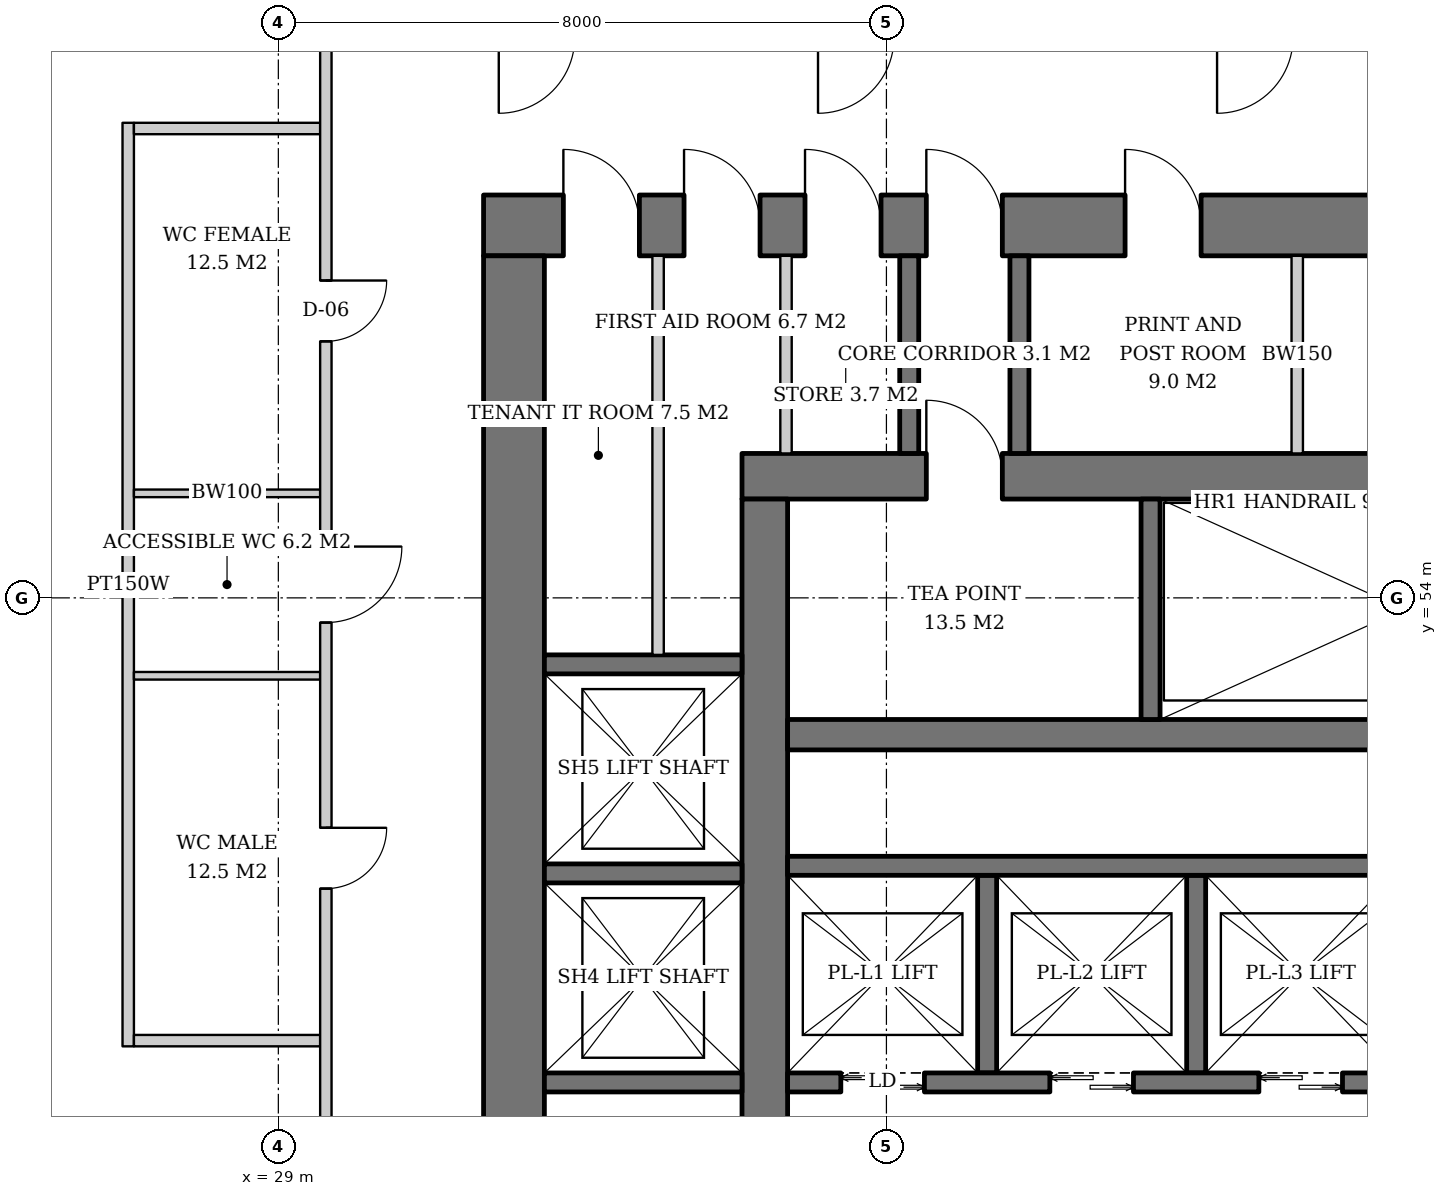
"""IFC4 building model, lengths in metres.
Left out: names, types, materials, properties, quantities, classifications, styles, units other than length and angle.
Written with IfcOpenShell. Run it as: python <this file> out.ifc"""

import sys

from ifc_helpers import new_model, si_unit, direction, frame, frame_2d, origin, place, context, subcontext, project, spatial, rectangle, extrude, element, fill, save


model = new_model("IFC4")
c1 = context("Model", 3, precision=1e-05, world=origin(), true_north=direction((0.0, 1.0)))
c2 = subcontext(c1, "Body", "Model", "MODEL_VIEW")
j1 = project(units=[si_unit("LENGTHUNIT", "METRE"), si_unit("PLANEANGLEUNIT", "RADIAN")], contexts=[c1])
p1 = place(None, origin())
s1 = spatial("IfcSite", under=j1, at=p1, CompositionType="ELEMENT")
p2 = place(p1, origin())
s2 = spatial("IfcBuilding", under=s1, at=p2, CompositionType="ELEMENT")
p3 = place(p2, frame((0.0, 0.0, 78.0)))
s3 = spatial("IfcBuildingStorey", under=s2, at=p3, CompositionType="ELEMENT", Elevation=78.0)
p4 = place(p3, frame((35.1, 55.6, 0.0), z_axis=(0.0, 0.0, 1.0), x_axis=(1.0, 0.0, 0.0)))
e1 = element("IfcWall", 1, at=p4, inside=s3, PredefinedType="SHEAR", context=c2, shape_type="SweptSolid", body=[
    extrude(rectangle(XDim=19.8, YDim=0.6, at=frame_2d((9.9, 0.0))), origin(), (0.0, 0.0, 1.0), 3.8),
])
p5 = place(p4, frame((14.54, 0.0, 0.0)))
e2 = element("IfcOpeningElement", 2, at=p5, cuts=e1, PredefinedType="OPENING", context=c2, shape_type="SweptSolid", body=[
    extrude(rectangle(XDim=1.0, YDim=2.1, at=frame_2d((0.5, 1.05))), frame((0.0, 0.31, 0.0), z_axis=(0.0, -1.0, 0.0), x_axis=(1.0, 0.0, 0.0)), (0.0, 0.0, 1.0), 0.62),
])
p6 = place(p4, frame((2.425, 0.0, 0.0)))
e3 = element("IfcOpeningElement", 3, at=p6, cuts=e1, PredefinedType="OPENING", context=c2, shape_type="SweptSolid", body=[
    extrude(rectangle(XDim=1.0, YDim=2.1, at=frame_2d((0.5, 1.05))), frame((0.0, 0.31, 0.0), z_axis=(0.0, -1.0, 0.0), x_axis=(1.0, 0.0, 0.0)), (0.0, 0.0, 1.0), 0.62),
])
p7 = place(p3, frame((35.4, 36.7, 0.0), z_axis=(0.0, 0.0, 1.0), x_axis=(0.0, 1.0, 0.0)))
e4 = element("IfcWall", 4, at=p7, inside=s3, PredefinedType="SHEAR", context=c2, shape_type="SweptSolid", body=[
    extrude(rectangle(XDim=18.6, YDim=0.6, at=frame_2d((9.3, 0.0))), origin(), (0.0, 0.0, 1.0), 3.8),
])
p8 = place(p7, frame((8.4, 0.0, 0.0)))
e5 = element("IfcOpeningElement", 5, at=p8, cuts=e4, PredefinedType="OPENING", context=c2, shape_type="SweptSolid", body=[
    extrude(rectangle(XDim=1.8, YDim=2.4, at=frame_2d((0.9, 1.2))), frame((0.0, 0.31, 0.0), z_axis=(0.0, -1.0, 0.0), x_axis=(1.0, 0.0, 0.0)), (0.0, 0.0, 1.0), 0.62),
])
p9 = place(p3, frame((31.7, 58.9, 0.0), z_axis=(0.0, 0.0, 1.0), x_axis=(1.0, 0.0, 0.0)))
e6 = element("IfcWall", 6, at=p9, inside=s3, PredefinedType="SHEAR", context=c2, shape_type="SweptSolid", body=[
    extrude(rectangle(XDim=26.6, YDim=0.8, at=frame_2d((13.3, 0.0))), origin(), (0.0, 0.0, 1.0), 3.8),
])
p10 = place(p9, frame((17.94, 0.0, 0.0)))
e7 = element("IfcOpeningElement", 7, at=p10, cuts=e6, PredefinedType="OPENING", context=c2, shape_type="SweptSolid", body=[
    extrude(rectangle(XDim=1.0, YDim=2.1, at=frame_2d((0.5, 1.05))), frame((0.0, 0.41, 0.0), z_axis=(0.0, -1.0, 0.0), x_axis=(1.0, 0.0, 0.0)), (0.0, 0.0, 1.0), 0.82),
])
p11 = place(p9, frame((5.825, 0.0, 0.0)))
e8 = element("IfcOpeningElement", 8, at=p11, cuts=e6, PredefinedType="OPENING", context=c2, shape_type="SweptSolid", body=[
    extrude(rectangle(XDim=1.0, YDim=2.1, at=frame_2d((0.5, 1.05))), frame((0.0, 0.41, 0.0), z_axis=(0.0, -1.0, 0.0), x_axis=(1.0, 0.0, 0.0)), (0.0, 0.0, 1.0), 0.82),
])
p12 = place(p9, frame((1.05, 0.0, 0.0)))
e9 = element("IfcOpeningElement", 9, at=p12, cuts=e6, PredefinedType="OPENING", context=c2, shape_type="SweptSolid", body=[
    extrude(rectangle(XDim=1.0, YDim=2.1, at=frame_2d((0.5, 1.05))), frame((0.0, 0.41, 0.0), z_axis=(0.0, -1.0, 0.0), x_axis=(1.0, 0.0, 0.0)), (0.0, 0.0, 1.0), 0.82),
])
p13 = place(p9, frame((2.637, 0.0, 0.0)))
e10 = element("IfcOpeningElement", 10, at=p13, cuts=e6, PredefinedType="OPENING", context=c2, shape_type="SweptSolid", body=[
    extrude(rectangle(XDim=1.0, YDim=2.1, at=frame_2d((0.5, 1.05))), frame((0.0, 0.41, 0.0), z_axis=(0.0, -1.0, 0.0), x_axis=(1.0, 0.0, 0.0)), (0.0, 0.0, 1.0), 0.82),
])
p14 = place(p9, frame((4.229, 0.0, 0.0)))
e11 = element("IfcOpeningElement", 11, at=p14, cuts=e6, PredefinedType="OPENING", context=c2, shape_type="SweptSolid", body=[
    extrude(rectangle(XDim=1.0, YDim=2.1, at=frame_2d((0.5, 1.05))), frame((0.0, 0.41, 0.0), z_axis=(0.0, -1.0, 0.0), x_axis=(1.0, 0.0, 0.0)), (0.0, 0.0, 1.0), 0.82),
])
p15 = place(p9, frame((8.44, 0.0, 0.0)))
e12 = element("IfcOpeningElement", 12, at=p15, cuts=e6, PredefinedType="OPENING", context=c2, shape_type="SweptSolid", body=[
    extrude(rectangle(XDim=1.0, YDim=2.1, at=frame_2d((0.5, 1.05))), frame((0.0, 0.41, 0.0), z_axis=(0.0, -1.0, 0.0), x_axis=(1.0, 0.0, 0.0)), (0.0, 0.0, 1.0), 0.82),
])
p16 = place(p9, frame((13.342, 0.0, 0.0)))
e13 = element("IfcOpeningElement", 13, at=p16, cuts=e6, PredefinedType="OPENING", context=c2, shape_type="SweptSolid", body=[
    extrude(rectangle(XDim=1.0, YDim=2.1, at=frame_2d((0.5, 1.05))), frame((0.0, 0.41, 0.0), z_axis=(0.0, -1.0, 0.0), x_axis=(1.0, 0.0, 0.0)), (0.0, 0.0, 1.0), 0.82),
])
p17 = place(p9, frame((22.35, 0.0, 0.0)))
e14 = element("IfcOpeningElement", 14, at=p17, cuts=e6, PredefinedType="OPENING", context=c2, shape_type="SweptSolid", body=[
    extrude(rectangle(XDim=1.0, YDim=2.1, at=frame_2d((0.5, 1.05))), frame((0.0, 0.41, 0.0), z_axis=(0.0, -1.0, 0.0), x_axis=(1.0, 0.0, 0.0)), (0.0, 0.0, 1.0), 0.82),
])
p18 = place(p3, frame((32.1, 33.5, 0.0), z_axis=(0.0, 0.0, 1.0), x_axis=(0.0, 1.0, 0.0)))
e15 = element("IfcWall", 15, at=p18, inside=s3, PredefinedType="SHEAR", context=c2, shape_type="SweptSolid", body=[
    extrude(rectangle(XDim=25.0, YDim=0.8, at=frame_2d((12.5, 0.0))), origin(), (0.0, 0.0, 1.0), 3.8),
])
p19 = place(p18, frame((11.6, 0.0, 0.0)))
e16 = element("IfcOpeningElement", 16, at=p19, cuts=e15, PredefinedType="OPENING", context=c2, shape_type="SweptSolid", body=[
    extrude(rectangle(XDim=1.8, YDim=2.4, at=frame_2d((0.9, 1.2))), frame((0.0, 0.41, 0.0), z_axis=(0.0, -1.0, 0.0), x_axis=(1.0, 0.0, 0.0)), (0.0, 0.0, 1.0), 0.82),
])
p20 = place(p3, frame((35.7, 52.2, 0.0), z_axis=(0.0, 0.0, 1.0), x_axis=(1.0, 0.0, 0.0)))
e17 = element("IfcWall", 17, at=p20, inside=s3, PredefinedType="SHEAR", context=c2, shape_type="SweptSolid", body=[
    extrude(rectangle(XDim=18.6, YDim=0.4, at=frame_2d((9.3, 0.0))), origin(), (0.0, 0.0, 1.0), 3.8),
])
p21 = place(p3, frame((40.475, 52.4, 0.0), z_axis=(0.0, 0.0, 1.0), x_axis=(0.0, 1.0, 0.0)))
e18 = element("IfcWall", 18, at=p21, inside=s3, PredefinedType="SHEAR", context=c2, shape_type="SweptSolid", body=[
    extrude(rectangle(XDim=2.9, YDim=0.25, at=frame_2d((1.45, 0.0))), origin(), (0.0, 0.0, 1.0), 3.8),
])
for number, where, z_axis, x_axis in (
    (19, (38.325, 47.75, 0.0), (0.0, 0.0, 1.0), (0.0, 1.0, 0.0)),
    (20, (41.075, 47.75, 0.0), (0.0, 0.0, 1.0), (0.0, 1.0, 0.0)),
):
    element("IfcWall", number, at=place(p3, frame(where, z_axis=z_axis, x_axis=x_axis)), inside=s3, PredefinedType="SHEAR", context=c2, shape_type="SweptSolid", body=[
        extrude(rectangle(XDim=2.6, YDim=0.25, at=frame_2d((1.3, 0.0))), origin(), (0.0, 0.0, 1.0), 3.8),
    ])
p22 = place(p3, frame((35.7, 50.475, 0.0), z_axis=(0.0, 0.0, 1.0), x_axis=(1.0, 0.0, 0.0)))
e21 = element("IfcWall", 21, at=p22, inside=s3, PredefinedType="SHEAR", context=c2, shape_type="SweptSolid", body=[
    extrude(rectangle(XDim=11.0, YDim=0.25, at=frame_2d((5.5, 0.0))), origin(), (0.0, 0.0, 1.0), 3.8),
])
p23 = place(p3, frame((35.7, 47.625, 0.0), z_axis=(0.0, 0.0, 1.0), x_axis=(1.0, 0.0, 0.0)))
e22 = element("IfcWall", 22, at=p23, inside=s3, PredefinedType="SHEAR", context=c2, shape_type="SweptSolid", body=[
    extrude(rectangle(XDim=12.83, YDim=0.25, at=frame_2d((6.415, 0.0))), origin(), (0.0, 0.0, 1.0), 3.8),
])
p24 = place(p23, frame((0.7, 0.0, 0.0)))
e23 = element("IfcOpeningElement", 23, at=p24, cuts=e22, PredefinedType="OPENING", context=c2, shape_type="SweptSolid", body=[
    extrude(rectangle(XDim=1.1, YDim=2.2, at=frame_2d((0.55, 1.1))), frame((0.0, 0.135, 0.0), z_axis=(0.0, -1.0, 0.0), x_axis=(1.0, 0.0, 0.0)), (0.0, 0.0, 1.0), 0.27),
])
p25 = place(p23, frame((3.45, 0.0, 0.0)))
e24 = element("IfcOpeningElement", 24, at=p25, cuts=e22, PredefinedType="OPENING", context=c2, shape_type="SweptSolid", body=[
    extrude(rectangle(XDim=1.1, YDim=2.2, at=frame_2d((0.55, 1.1))), frame((0.0, 0.135, 0.0), z_axis=(0.0, -1.0, 0.0), x_axis=(1.0, 0.0, 0.0)), (0.0, 0.0, 1.0), 0.27),
])
p26 = place(p23, frame((6.2, 0.0, 0.0)))
e25 = element("IfcOpeningElement", 25, at=p26, cuts=e22, PredefinedType="OPENING", context=c2, shape_type="SweptSolid", body=[
    extrude(rectangle(XDim=1.1, YDim=2.2, at=frame_2d((0.55, 1.1))), frame((0.0, 0.135, 0.0), z_axis=(0.0, -1.0, 0.0), x_axis=(1.0, 0.0, 0.0)), (0.0, 0.0, 1.0), 0.27),
])
p27 = place(p23, frame((8.95, 0.0, 0.0)))
e26 = element("IfcOpeningElement", 26, at=p27, cuts=e22, PredefinedType="OPENING", context=c2, shape_type="SweptSolid", body=[
    extrude(rectangle(XDim=1.1, YDim=2.2, at=frame_2d((0.55, 1.1))), frame((0.0, 0.135, 0.0), z_axis=(0.0, -1.0, 0.0), x_axis=(1.0, 0.0, 0.0)), (0.0, 0.0, 1.0), 0.27),
])
p28 = place(p23, frame((11.515, 0.0, 0.0)))
e27 = element("IfcOpeningElement", 27, at=p28, cuts=e22, PredefinedType="OPENING", context=c2, shape_type="SweptSolid", body=[
    extrude(rectangle(XDim=0.8, YDim=2.0, at=frame_2d((0.4, 1.0))), frame((0.0, 0.135, 0.0), z_axis=(0.0, -1.0, 0.0), x_axis=(1.0, 0.0, 0.0)), (0.0, 0.0, 1.0), 0.27),
])
for number, where, z_axis, x_axis in (
    (28, (32.5, 47.625, 0.0), (0.0, 0.0, 1.0), (1.0, 0.0, 0.0)),
    (29, (32.5, 50.375, 0.0), (0.0, 0.0, 1.0), (1.0, 0.0, 0.0)),
    (30, (32.5, 53.125, 0.0), (0.0, 0.0, 1.0), (1.0, 0.0, 0.0)),
):
    element("IfcWall", number, at=place(p3, frame(where, z_axis=z_axis, x_axis=x_axis)), inside=s3, PredefinedType="SHEAR", context=c2, shape_type="SweptSolid", body=[
        extrude(rectangle(XDim=2.6, YDim=0.25, at=frame_2d((1.3, 0.0))), origin(), (0.0, 0.0, 1.0), 3.8),
    ])
for number, where, z_axis, x_axis in (
    (31, (37.3, 55.9, 0.0), (0.0, 0.0, 1.0), (0.0, 1.0, 0.0)),
    (32, (38.75, 55.9, 0.0), (0.0, 0.0, 1.0), (0.0, 1.0, 0.0)),
):
    element("IfcWall", number, at=place(p3, frame(where, z_axis=z_axis, x_axis=x_axis)), inside=s3, PredefinedType="SOLIDWALL", context=c2, shape_type="SweptSolid", body=[
        extrude(rectangle(XDim=2.6, YDim=0.25, at=frame_2d((1.3, 0.0))), origin(), (0.0, 0.0, 1.0), 3.52),
    ])
p29 = place(p3, frame((33.996, 53.25, 0.0), z_axis=(0.0, 0.0, 1.0), x_axis=(0.0, 1.0, 0.0)))
e33 = element("IfcWall", 33, at=p29, inside=s3, PredefinedType="SOLIDWALL", context=c2, shape_type="SweptSolid", body=[
    extrude(rectangle(XDim=5.25, YDim=0.15, at=frame_2d((2.625, 0.0))), origin(), (0.0, 0.0, 1.0), 3.52),
])
for number, where, z_axis, x_axis in (
    (34, (35.679, 55.9, 0.0), (0.0, 0.0, 1.0), (0.0, 1.0, 0.0)),
    (35, (42.405, 55.9, 0.0), (0.0, 0.0, 1.0), (0.0, 1.0, 0.0)),
):
    element("IfcWall", number, at=place(p3, frame(where, z_axis=z_axis, x_axis=x_axis)), inside=s3, PredefinedType="SOLIDWALL", context=c2, shape_type="SweptSolid", body=[
        extrude(rectangle(XDim=2.6, YDim=0.15, at=frame_2d((1.3, 0.0))), origin(), (0.0, 0.0, 1.0), 3.52),
    ])
p30 = place(p3, frame((27.025, 60.25, 0.0), z_axis=(0.0, 0.0, 1.0), x_axis=(0.0, -1.0, 0.0)))
e36 = element("IfcWall", 36, at=p30, inside=s3, PredefinedType="PARTITIONING", context=c2, shape_type="SweptSolid", body=[
    extrude(rectangle(XDim=12.15, YDim=0.15, at=frame_2d((6.075, 0.0))), origin(), (0.0, 0.0, 1.0), 2.62),
])
p31 = place(p3, frame((29.55, 60.175, 0.0), z_axis=(0.0, 0.0, 1.0), x_axis=(-1.0, 0.0, 0.0)))
e37 = element("IfcWall", 37, at=p31, inside=s3, PredefinedType="PARTITIONING", context=c2, shape_type="SweptSolid", body=[
    extrude(rectangle(XDim=2.45, YDim=0.15, at=frame_2d((1.225, 0.0))), origin(), (0.0, 0.0, 1.0), 3.52),
])
for number, where, z_axis, x_axis in (
    (38, (29.55, 55.375, 0.0), (0.0, 0.0, 1.0), (-1.0, 0.0, 0.0)),
    (39, (29.55, 52.975, 0.0), (0.0, 0.0, 1.0), (-1.0, 0.0, 0.0)),
):
    element("IfcWall", number, at=place(p3, frame(where, z_axis=z_axis, x_axis=x_axis)), inside=s3, PredefinedType="SOLIDWALL", context=c2, shape_type="SweptSolid", body=[
        extrude(rectangle(XDim=2.45, YDim=0.1, at=frame_2d((1.225, 0.0))), origin(), (0.0, 0.0, 1.0), 3.52),
    ])
p32 = place(p3, frame((29.55, 48.175, 0.0), z_axis=(0.0, 0.0, 1.0), x_axis=(-1.0, 0.0, 0.0)))
e40 = element("IfcWall", 40, at=p32, inside=s3, PredefinedType="PARTITIONING", context=c2, shape_type="SweptSolid", body=[
    extrude(rectangle(XDim=2.45, YDim=0.15, at=frame_2d((1.225, 0.0))), origin(), (0.0, 0.0, 1.0), 3.52),
])
p33 = place(p3, frame((29.625, 61.45, 0.0), z_axis=(0.0, 0.0, 1.0), x_axis=(0.0, -1.0, 0.0)))
e41 = element("IfcWall", 41, at=p33, inside=s3, PredefinedType="PARTITIONING", context=c2, shape_type="SweptSolid", body=[
    extrude(rectangle(XDim=30.75, YDim=0.15, at=frame_2d((15.375, 0.0))), origin(), (0.0, 0.0, 1.0), 2.512),
])
p34 = place(p33, frame((3.275, 0.0, 0.0)))
e42 = element("IfcOpeningElement", 42, at=p34, cuts=e41, PredefinedType="OPENING", context=c2, shape_type="SweptSolid", body=[
    extrude(rectangle(XDim=0.8, YDim=2.1, at=frame_2d((0.4, 1.05))), frame((0.0, 0.085, 0.0), z_axis=(0.0, -1.0, 0.0), x_axis=(1.0, 0.0, 0.0)), (0.0, 0.0, 1.0), 0.17),
])
p35 = place(p33, frame((6.775, 0.0, 0.0)))
e43 = element("IfcOpeningElement", 43, at=p35, cuts=e41, PredefinedType="OPENING", context=c2, shape_type="SweptSolid", body=[
    extrude(rectangle(XDim=1.0, YDim=2.1, at=frame_2d((0.5, 1.05))), frame((0.0, 0.085, 0.0), z_axis=(0.0, -1.0, 0.0), x_axis=(1.0, 0.0, 0.0)), (0.0, 0.0, 1.0), 0.17),
])
p36 = place(p33, frame((10.475, 0.0, 0.0)))
e44 = element("IfcOpeningElement", 44, at=p36, cuts=e41, PredefinedType="OPENING", context=c2, shape_type="SweptSolid", body=[
    extrude(rectangle(XDim=0.8, YDim=2.1, at=frame_2d((0.4, 1.05))), frame((0.0, 0.085, 0.0), z_axis=(0.0, -1.0, 0.0), x_axis=(1.0, 0.0, 0.0)), (0.0, 0.0, 1.0), 0.17),
])
p37 = place(p24, origin())
e45 = element("IfcDoor", 45, at=p37, inside=s3, OperationType="DOUBLE_DOOR_SLIDING", PredefinedType="DOOR", context=c2, shape_type="SweptSolid", body=[
    extrude(rectangle(XDim=1.1, YDim=2.2, at=frame_2d((0.55, 1.1))), frame((0.0, 0.025, 0.0), z_axis=(0.0, -1.0, 0.0), x_axis=(1.0, 0.0, 0.0)), (0.0, 0.0, 1.0), 0.05),
])
fill(e23, e45)
p38 = place(p25, origin())
e46 = element("IfcDoor", 46, at=p38, inside=s3, OperationType="DOUBLE_DOOR_SLIDING", PredefinedType="DOOR", context=c2, shape_type="SweptSolid", body=[
    extrude(rectangle(XDim=1.1, YDim=2.2, at=frame_2d((0.55, 1.1))), frame((0.0, 0.025, 0.0), z_axis=(0.0, -1.0, 0.0), x_axis=(1.0, 0.0, 0.0)), (0.0, 0.0, 1.0), 0.05),
])
fill(e24, e46)
p39 = place(p26, origin())
e47 = element("IfcDoor", 47, at=p39, inside=s3, OperationType="DOUBLE_DOOR_SLIDING", PredefinedType="DOOR", context=c2, shape_type="SweptSolid", body=[
    extrude(rectangle(XDim=1.1, YDim=2.2, at=frame_2d((0.55, 1.1))), frame((0.0, 0.025, 0.0), z_axis=(0.0, -1.0, 0.0), x_axis=(1.0, 0.0, 0.0)), (0.0, 0.0, 1.0), 0.05),
])
fill(e25, e47)
p40 = place(p11, origin())
e48 = element("IfcDoor", 48, at=p40, inside=s3, OperationType="SINGLE_SWING_LEFT", PredefinedType="DOOR", context=c2, shape_type="SweptSolid", body=[
    extrude(rectangle(XDim=1.0, YDim=2.1, at=frame_2d((0.5, 1.05))), frame((0.0, 0.025, 0.0), z_axis=(0.0, -1.0, 0.0), x_axis=(1.0, 0.0, 0.0)), (0.0, 0.0, 1.0), 0.05),
])
fill(e8, e48)
p41 = place(p6, origin())
e49 = element("IfcDoor", 49, at=p41, inside=s3, OperationType="SINGLE_SWING_LEFT", PredefinedType="DOOR", context=c2, shape_type="SweptSolid", body=[
    extrude(rectangle(XDim=1.0, YDim=2.1, at=frame_2d((0.5, 1.05))), frame((0.0, -0.24, 0.0), z_axis=(0.0, -1.0, 0.0), x_axis=(1.0, 0.0, 0.0)), (0.0, 0.0, 1.0), 0.05),
])
fill(e3, e49)
p42 = place(p12, origin())
e50 = element("IfcDoor", 50, at=p42, inside=s3, OperationType="SINGLE_SWING_LEFT", PredefinedType="DOOR", context=c2, shape_type="SweptSolid", body=[
    extrude(rectangle(XDim=1.0, YDim=2.1, at=frame_2d((0.5, 1.05))), frame((0.0, -0.34, 0.0), z_axis=(0.0, -1.0, 0.0), x_axis=(1.0, 0.0, 0.0)), (0.0, 0.0, 1.0), 0.05),
])
fill(e9, e50)
p43 = place(p13, origin())
e51 = element("IfcDoor", 51, at=p43, inside=s3, OperationType="SINGLE_SWING_LEFT", PredefinedType="DOOR", context=c2, shape_type="SweptSolid", body=[
    extrude(rectangle(XDim=1.0, YDim=2.1, at=frame_2d((0.5, 1.05))), frame((0.0, -0.34, 0.0), z_axis=(0.0, -1.0, 0.0), x_axis=(1.0, 0.0, 0.0)), (0.0, 0.0, 1.0), 0.05),
])
fill(e10, e51)
p44 = place(p14, origin())
e52 = element("IfcDoor", 52, at=p44, inside=s3, OperationType="SINGLE_SWING_LEFT", PredefinedType="DOOR", context=c2, shape_type="SweptSolid", body=[
    extrude(rectangle(XDim=1.0, YDim=2.1, at=frame_2d((0.5, 1.05))), frame((0.0, -0.34, 0.0), z_axis=(0.0, -1.0, 0.0), x_axis=(1.0, 0.0, 0.0)), (0.0, 0.0, 1.0), 0.05),
])
fill(e11, e52)
p45 = place(p15, origin())
e53 = element("IfcDoor", 53, at=p45, inside=s3, OperationType="SINGLE_SWING_LEFT", PredefinedType="DOOR", context=c2, shape_type="SweptSolid", body=[
    extrude(rectangle(XDim=1.0, YDim=2.1, at=frame_2d((0.5, 1.05))), frame((0.0, -0.34, 0.0), z_axis=(0.0, -1.0, 0.0), x_axis=(1.0, 0.0, 0.0)), (0.0, 0.0, 1.0), 0.05),
])
fill(e12, e53)
p46 = place(p34, origin())
e54 = element("IfcDoor", 54, at=p46, inside=s3, OperationType="SINGLE_SWING_LEFT", PredefinedType="DOOR", context=c2, shape_type="SweptSolid", body=[
    extrude(rectangle(XDim=0.8, YDim=2.1, at=frame_2d((0.4, 1.05))), frame((0.0, 0.025, 0.0), z_axis=(0.0, -1.0, 0.0), x_axis=(1.0, 0.0, 0.0)), (0.0, 0.0, 1.0), 0.05),
])
fill(e42, e54)
p47 = place(p35, origin())
e55 = element("IfcDoor", 55, at=p47, inside=s3, OperationType="SINGLE_SWING_LEFT", PredefinedType="DOOR", context=c2, shape_type="SweptSolid", body=[
    extrude(rectangle(XDim=1.0, YDim=2.1, at=frame_2d((0.5, 1.05))), frame((0.0, 0.025, 0.0), z_axis=(0.0, -1.0, 0.0), x_axis=(1.0, 0.0, 0.0)), (0.0, 0.0, 1.0), 0.05),
])
fill(e43, e55)
p48 = place(p36, origin())
e56 = element("IfcDoor", 56, at=p48, inside=s3, OperationType="SINGLE_SWING_LEFT", PredefinedType="DOOR", context=c2, shape_type="SweptSolid", body=[
    extrude(rectangle(XDim=0.8, YDim=2.1, at=frame_2d((0.4, 1.05))), frame((0.0, 0.025, 0.0), z_axis=(0.0, -1.0, 0.0), x_axis=(1.0, 0.0, 0.0)), (0.0, 0.0, 1.0), 0.05),
])
fill(e44, e56)
save(model, sys.argv[1])
